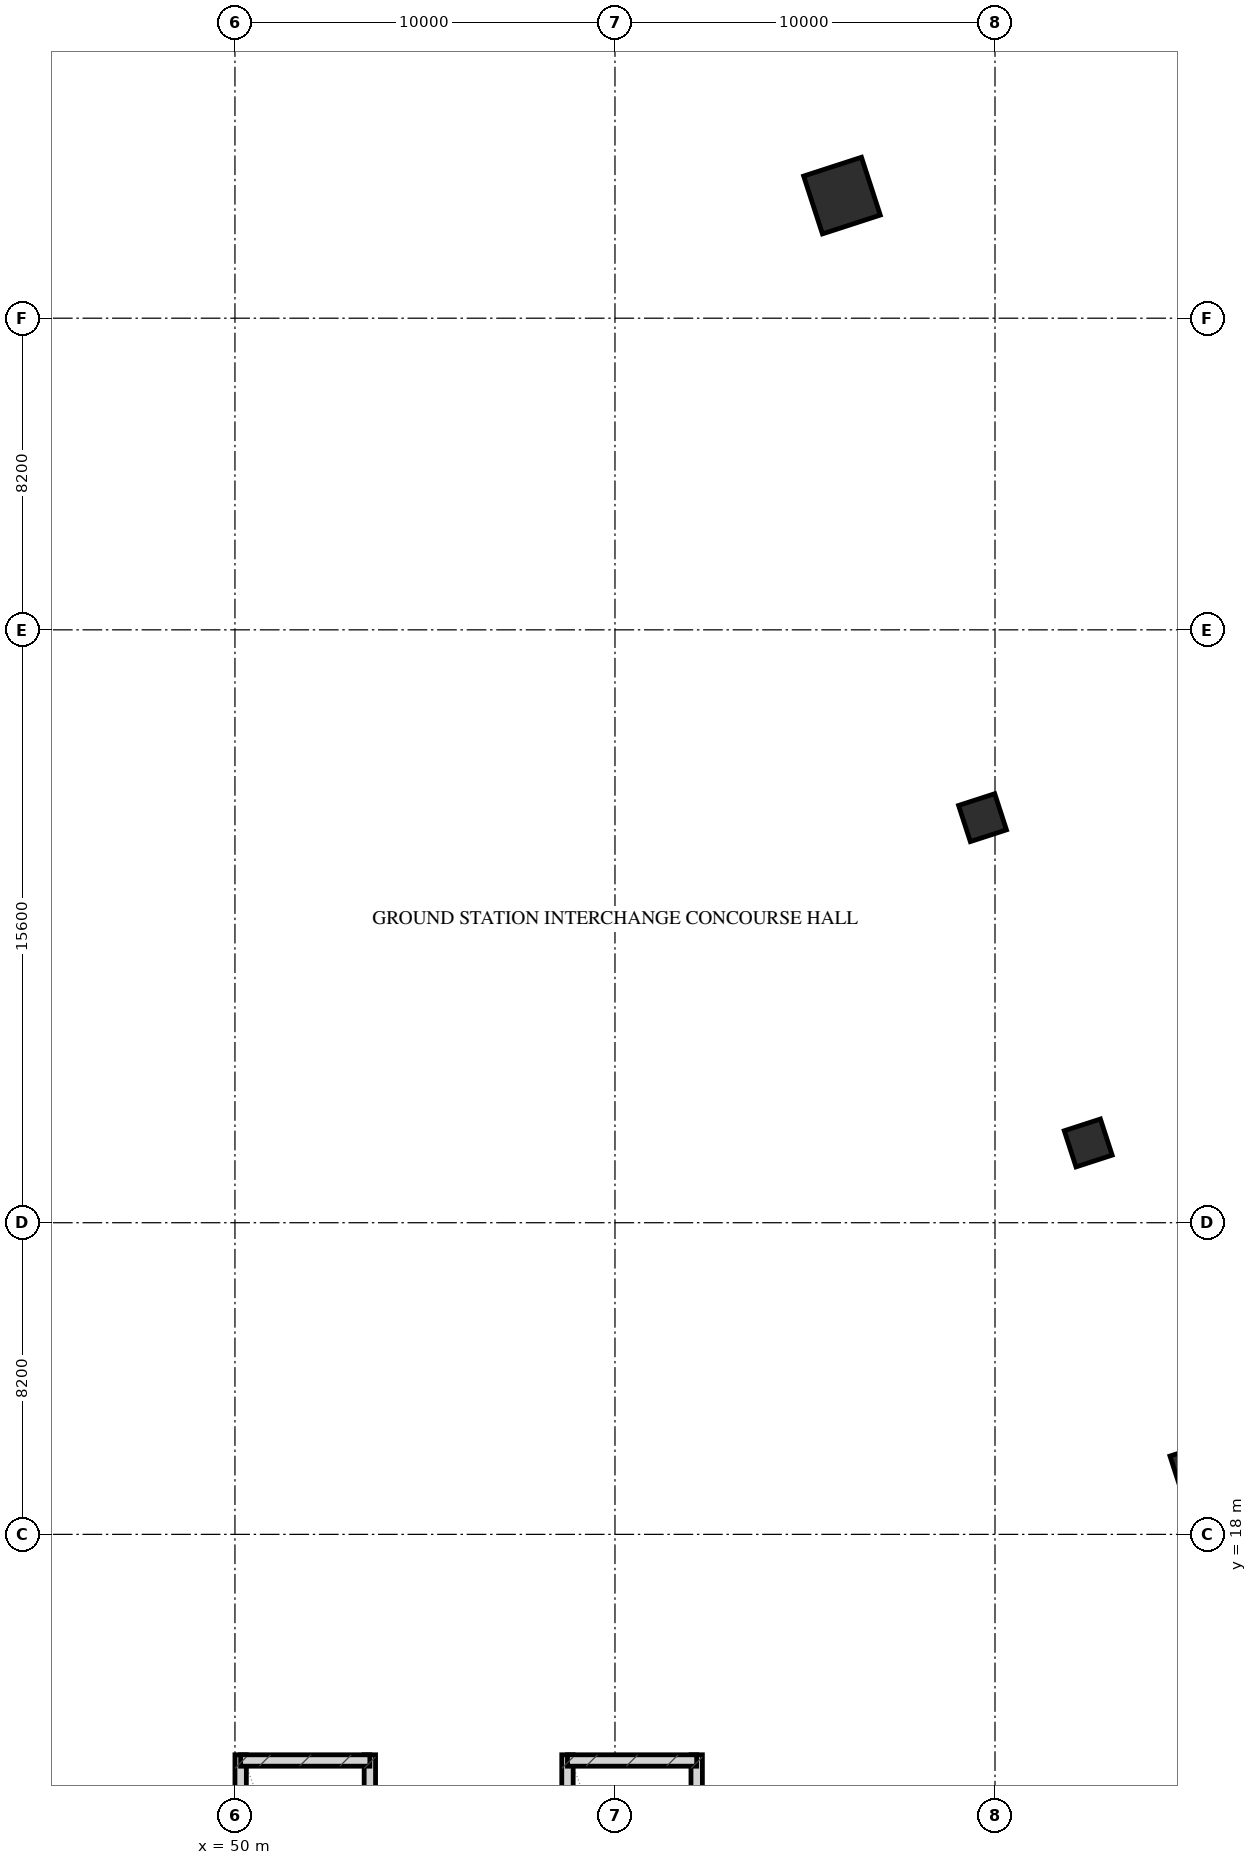
"""IFC4 building model, lengths in metres.
Left out: names, types, materials, properties, quantities, classifications, styles, units other than length and angle.
Written with IfcOpenShell. Run it as: python <this file> out.ifc"""

import sys

from ifc_helpers import new_model, si_unit, direction, frame, frame_2d, origin, origin_2d, place, context, subcontext, project, spatial, rectangle, hollow_rectangle, extrude, element, save


model = new_model("IFC4")
c1 = context("Model", 3, precision=1e-05, world=origin(), true_north=direction((0.0, 1.0)))
c2 = subcontext(c1, "Body", "Model", "MODEL_VIEW")
j1 = project(units=[si_unit("LENGTHUNIT", "METRE"), si_unit("PLANEANGLEUNIT", "RADIAN")], contexts=[c1])
p1 = place(None, origin())
s1 = spatial("IfcSite", under=j1, at=p1, CompositionType="ELEMENT")
p2 = place(p1, origin())
s2 = spatial("IfcBuilding", under=s1, at=p2, CompositionType="ELEMENT")
p3 = place(p2, origin())
s3 = spatial("IfcBuildingStorey", under=s2, at=p3, CompositionType="ELEMENT", Elevation=0.0)
for number, where, z_axis, x_axis in (
    (1, (50.15, 3.3, 0.0), (0.0, 0.0, 1.0), (0.0, 1.0, 0.0)),
    (2, (53.55, 3.3, 0.0), (0.0, 0.0, 1.0), (0.0, 1.0, 0.0)),
):
    element("IfcWall", number, at=place(p3, frame(where, z_axis=z_axis, x_axis=x_axis)), inside=s3, PredefinedType="SHEAR", context=c2, shape_type="SweptSolid", body=[
        extrude(rectangle(XDim=8.9, YDim=0.3, at=frame_2d((4.45, 0.0))), origin(), (0.0, 0.0, 1.0), 3.8),
    ])
p4 = place(p3, frame((50.15, 12.05, 0.0), z_axis=(0.0, 0.0, 1.0), x_axis=(1.0, 0.0, 0.0)))
e3 = element("IfcWall", 3, at=p4, inside=s3, PredefinedType="SHEAR", context=c2, shape_type="SweptSolid", body=[
    extrude(rectangle(XDim=3.4, YDim=0.3, at=frame_2d((1.7, 0.0))), origin(), (0.0, 0.0, 1.0), 3.8),
])
for number, where, z_axis, x_axis in (
    (4, (58.75, 3.3, 0.0), (0.0, 0.0, 1.0), (0.0, 1.0, 0.0)),
    (5, (62.15, 3.3, 0.0), (0.0, 0.0, 1.0), (0.0, 1.0, 0.0)),
):
    element("IfcWall", number, at=place(p3, frame(where, z_axis=z_axis, x_axis=x_axis)), inside=s3, PredefinedType="SHEAR", context=c2, shape_type="SweptSolid", body=[
        extrude(rectangle(XDim=8.9, YDim=0.3, at=frame_2d((4.45, 0.0))), origin(), (0.0, 0.0, 1.0), 3.8),
    ])
p5 = place(p3, frame((58.75, 12.05, 0.0), z_axis=(0.0, 0.0, 1.0), x_axis=(1.0, 0.0, 0.0)))
e6 = element("IfcWall", 6, at=p5, inside=s3, PredefinedType="SHEAR", context=c2, shape_type="SweptSolid", body=[
    extrude(rectangle(XDim=3.4, YDim=0.3, at=frame_2d((1.7, 0.0))), origin(), (0.0, 0.0, 1.0), 3.8),
])
p6 = place(p3, frame((65.973, 53.226, 0.0), z_axis=(0.0, 0.0, 1.0), x_axis=(0.951056516295, 0.309016994375, 0.0)))
e7 = element("IfcColumn", 7, at=p6, inside=s3, PredefinedType="COLUMN", context=c2, shape_type="SweptSolid", body=[
    extrude(hollow_rectangle(XDim=1.6, YDim=1.6, WallThickness=0.055, at=origin_2d()), origin(), (0.0, 0.0, 1.0), 6.001),
])
for number, where, z_axis, x_axis in (
    (8, (75.234, 19.739, 0.0), (0.0, 0.0, 1.0), (0.951, 0.309, 0.0)),
    (9, (72.453, 28.299, 0.0), (0.0, 0.0, 1.0), (0.951, 0.309, 0.0)),
    (10, (69.672, 36.858, 0.0), (0.0, 0.0, 1.0), (0.951, 0.309, 0.0)),
):
    element("IfcColumn", number, at=place(p3, frame(where, z_axis=z_axis, x_axis=x_axis)), inside=s3, PredefinedType="COLUMN", context=c2, shape_type="SweptSolid", body=[
        extrude(hollow_rectangle(XDim=1.0, YDim=1.0, WallThickness=0.036, at=origin_2d()), origin(), (0.0, 0.0, 1.0), 6.001),
    ])
save(model, sys.argv[1])
